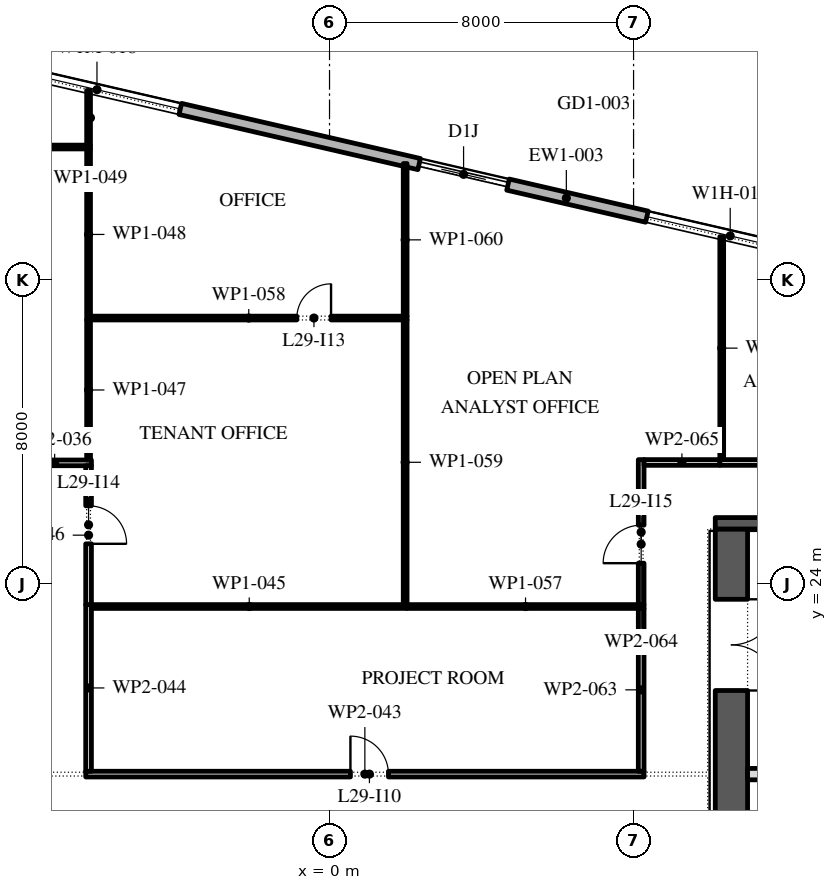
"""IFC4 building model, lengths in metres.
Left out: names, types, materials, properties, quantities, classifications, styles, units other than length and angle.
Written with IfcOpenShell. Run it as: python <this file> out.ifc"""

import sys

from ifc_helpers import new_model, si_unit, direction, frame, frame_2d, origin, place, context, subcontext, project, spatial, rectangle, extrude, element, fill, save


model = new_model("IFC4")
c1 = context("Model", 3, precision=1e-05, world=origin(), true_north=direction((0.0, 1.0)))
c2 = subcontext(c1, "Body", "Model", "MODEL_VIEW")
j1 = project(units=[si_unit("LENGTHUNIT", "METRE"), si_unit("PLANEANGLEUNIT", "RADIAN")], contexts=[c1])
p1 = place(None, origin())
s1 = spatial("IfcSite", under=j1, at=p1, CompositionType="ELEMENT")
p2 = place(p1, origin())
s2 = spatial("IfcBuilding", under=s1, at=p2, CompositionType="ELEMENT")
p3 = place(p2, frame((0.0, 0.0, 135.0)))
s3 = spatial("IfcBuildingStorey", under=s2, at=p3, CompositionType="ELEMENT", Elevation=135.0)
p4 = place(p3, frame((31.078, 28.421, 0.0), z_axis=(0.0, 0.0, 1.0), x_axis=(-0.974370456532, 0.224949357493, 0.0)))
e1 = element("IfcWall", 1, at=p4, inside=s3, PredefinedType="STANDARD", context=c2, shape_type="SweptSolid", body=[
    extrude(rectangle(XDim=51.0, YDim=0.3, at=frame_2d((25.5, 0.0))), origin(), (0.0, 0.0, 1.0), 4.0),
])
p5 = place(p4, frame((1.875, 0.0, 0.45)))
e2 = element("IfcOpeningElement", 2, at=p5, cuts=e1, PredefinedType="OPENING", context=c2, shape_type="SweptSolid", body=[
    extrude(rectangle(XDim=4.5, YDim=2.95, at=frame_2d((2.25, 1.475))), frame((0.0, 0.16, 0.0), z_axis=(0.0, -1.0, 0.0), x_axis=(1.0, 0.0, 0.0)), (0.0, 0.0, 1.0), 0.32),
])
p6 = place(p4, frame((10.275, 0.0, 0.45)))
e3 = element("IfcOpeningElement", 3, at=p6, cuts=e1, PredefinedType="OPENING", context=c2, shape_type="SweptSolid", body=[
    extrude(rectangle(XDim=4.5, YDim=2.825, at=frame_2d((2.25, 1.413))), frame((0.0, 0.16, 0.0), z_axis=(0.0, -1.0, 0.0), x_axis=(1.0, 0.0, 0.0)), (0.0, 0.0, 1.0), 0.32),
])
p7 = place(p4, frame((18.825, 0.0, 0.45)))
e4 = element("IfcOpeningElement", 4, at=p7, cuts=e1, PredefinedType="OPENING", context=c2, shape_type="SweptSolid", body=[
    extrude(rectangle(XDim=4.5, YDim=2.75, at=frame_2d((2.25, 1.375))), frame((0.0, 0.16, 0.0), z_axis=(0.0, -1.0, 0.0), x_axis=(1.0, 0.0, 0.0)), (0.0, 0.0, 1.0), 0.32),
])
p8 = place(p4, frame((27.075, 0.0, 0.0)))
e5 = element("IfcOpeningElement", 5, at=p8, cuts=e1, PredefinedType="OPENING", context=c2, shape_type="SweptSolid", body=[
    extrude(rectangle(XDim=2.4, YDim=3.125, at=frame_2d((1.2, 1.562))), frame((0.0, 0.16, 0.0), z_axis=(0.0, -1.0, 0.0), x_axis=(1.0, 0.0, 0.0)), (0.0, 0.0, 1.0), 0.32),
])
p9 = place(p4, frame((35.925, 0.0, 0.45)))
e6 = element("IfcOpeningElement", 6, at=p9, cuts=e1, PredefinedType="OPENING", context=c2, shape_type="SweptSolid", body=[
    extrude(rectangle(XDim=4.5, YDim=2.575, at=frame_2d((2.25, 1.288))), frame((0.0, 0.16, 0.0), z_axis=(0.0, -1.0, 0.0), x_axis=(1.0, 0.0, 0.0)), (0.0, 0.0, 1.0), 0.32),
])
p10 = place(p4, frame((44.475, 0.0, 0.45)))
e7 = element("IfcOpeningElement", 7, at=p10, cuts=e1, PredefinedType="OPENING", context=c2, shape_type="SweptSolid", body=[
    extrude(rectangle(XDim=4.5, YDim=2.45, at=frame_2d((2.25, 1.225))), frame((0.0, 0.16, 0.0), z_axis=(0.0, -1.0, 0.0), x_axis=(1.0, 0.0, 0.0)), (0.0, 0.0, 1.0), 0.32),
])
p11 = place(p3, frame((10.575, -2.45, 0.0), z_axis=(0.0, 0.0, 1.0), x_axis=(0.0, 1.0, 0.0)))
e8 = element("IfcWall", 8, at=p11, inside=s3, PredefinedType="SHEAR", context=c2, shape_type="SweptSolid", body=[
    extrude(rectangle(XDim=27.9, YDim=0.85, at=frame_2d((13.95, 0.0))), origin(), (0.0, 0.0, 1.0), 4.0),
])
p12 = place(p11, frame((23.65, 0.0, 0.0)))
e9 = element("IfcOpeningElement", 9, at=p12, cuts=e8, PredefinedType="OPENING", context=c2, shape_type="SweptSolid", body=[
    extrude(rectangle(XDim=2.4, YDim=2.1, at=frame_2d((1.2, 1.05))), frame((0.0, 0.435, 0.0), z_axis=(0.0, -1.0, 0.0), x_axis=(1.0, 0.0, 0.0)), (0.0, 0.0, 1.0), 0.87),
])
p13 = place(p11, frame((1.087, 0.0, 0.0)))
e10 = element("IfcOpeningElement", 10, at=p13, cuts=e8, PredefinedType="OPENING", context=c2, shape_type="SweptSolid", body=[
    extrude(rectangle(XDim=0.9, YDim=2.1, at=frame_2d((0.45, 1.05))), frame((0.0, 0.435, 0.0), z_axis=(0.0, -1.0, 0.0), x_axis=(1.0, 0.0, 0.0)), (0.0, 0.0, 1.0), 0.87),
])
p14 = place(p11, frame((4.262, 0.0, 0.0)))
e11 = element("IfcOpeningElement", 11, at=p14, cuts=e8, PredefinedType="OPENING", context=c2, shape_type="SweptSolid", body=[
    extrude(rectangle(XDim=1.0, YDim=2.1, at=frame_2d((0.5, 1.05))), frame((0.0, 0.435, 0.0), z_axis=(0.0, -1.0, 0.0), x_axis=(1.0, 0.0, 0.0)), (0.0, 0.0, 1.0), 0.87),
])
p15 = place(p3, frame((10.15, 25.6, 0.0), z_axis=(0.0, 0.0, 1.0), x_axis=(1.0, 0.0, 0.0)))
e12 = element("IfcWall", 12, at=p15, inside=s3, PredefinedType="SHEAR", context=c2, shape_type="SweptSolid", body=[
    extrude(rectangle(XDim=11.7, YDim=0.3, at=frame_2d((5.85, 0.0))), origin(), (0.0, 0.0, 1.0), 4.0),
])
p16 = place(p3, frame((11.0, 19.0, 0.0), z_axis=(0.0, 0.0, 1.0), x_axis=(1.0, 0.0, 0.0)))
e13 = element("IfcWall", 13, at=p16, inside=s3, PredefinedType="PARTITIONING", context=c2, shape_type="SweptSolid", body=[
    extrude(rectangle(XDim=3.0, YDim=0.3, at=frame_2d((1.5, 0.0))), origin(), (0.0, 0.0, 1.0), 4.0),
])
p17 = place(p3, frame((-14.62, 35.5, 0.0), z_axis=(0.0, 0.0, 1.0), x_axis=(1.0, 0.0, 0.0)))
e14 = element("IfcWall", 14, at=p17, inside=s3, PredefinedType="PARTITIONING", context=c2, shape_type="SweptSolid", body=[
    extrude(rectangle(XDim=8.33, YDim=0.1, at=frame_2d((4.165, 0.0))), origin(), (0.0, 0.0, 1.0), 4.0),
])
p18 = place(p17, frame((5.43, 0.0, 0.0)))
e15 = element("IfcOpeningElement", 15, at=p18, cuts=e14, PredefinedType="OPENING", context=c2, shape_type="SweptSolid", body=[
    extrude(rectangle(XDim=0.9, YDim=2.1, at=frame_2d((0.45, 1.05))), frame((0.0, 0.06, 0.0), z_axis=(0.0, -1.0, 0.0), x_axis=(1.0, 0.0, 0.0)), (0.0, 0.0, 1.0), 0.12),
])
p19 = place(p3, frame((-8.2, 27.19, 0.0), z_axis=(0.0, 0.0, 1.0), x_axis=(1.0, 0.0, 0.0)))
e16 = element("IfcWall", 16, at=p19, inside=s3, PredefinedType="PARTITIONING", context=c2, shape_type="SweptSolid", body=[
    extrude(rectangle(XDim=1.935, YDim=0.15, at=frame_2d((0.968, 0.0))), origin(), (0.0, 0.0, 1.0), 4.0),
])
p20 = place(p3, frame((-6.415, 19.0, 0.0), z_axis=(0.0, 0.0, 1.0), x_axis=(1.0, 0.0, 0.0)))
e17 = element("IfcWall", 17, at=p20, inside=s3, PredefinedType="PARTITIONING", context=c2, shape_type="SweptSolid", body=[
    extrude(rectangle(XDim=14.69, YDim=0.15, at=frame_2d((7.345, 0.0))), origin(), (0.0, 0.0, 1.0), 4.0),
])
p21 = place(p20, frame((6.965, 0.0, 0.0)))
e18 = element("IfcOpeningElement", 18, at=p21, cuts=e17, PredefinedType="OPENING", context=c2, shape_type="SweptSolid", body=[
    extrude(rectangle(XDim=1.0, YDim=2.1, at=frame_2d((0.5, 1.05))), frame((0.0, 0.085, 0.0), z_axis=(0.0, -1.0, 0.0), x_axis=(1.0, 0.0, 0.0)), (0.0, 0.0, 1.0), 0.17),
])
p22 = place(p3, frame((-6.34, 23.46, 0.0), z_axis=(0.0, 0.0, 1.0), x_axis=(0.0, -1.0, 0.0)))
e19 = element("IfcWall", 19, at=p22, inside=s3, PredefinedType="PARTITIONING", context=c2, shape_type="SweptSolid", body=[
    extrude(rectangle(XDim=4.385, YDim=0.15, at=frame_2d((2.192, 0.0))), origin(), (0.0, 0.0, 1.0), 4.0),
])
p23 = place(p3, frame((-6.265, 23.41, 0.0), z_axis=(0.0, 0.0, 1.0), x_axis=(1.0, 0.0, 0.0)))
e20 = element("IfcWall", 20, at=p23, inside=s3, PredefinedType="PARTITIONING", context=c2, shape_type="SweptSolid", body=[
    extrude(rectangle(XDim=8.305, YDim=0.1, at=frame_2d((4.152, 0.0))), origin(), (0.0, 0.0, 1.0), 4.0),
])
p24 = place(p3, frame((-6.34, 27.115, 0.0), z_axis=(0.0, 0.0, 1.0), x_axis=(0.0, -1.0, 0.0)))
e21 = element("IfcWall", 21, at=p24, inside=s3, PredefinedType="PARTITIONING", context=c2, shape_type="SweptSolid", body=[
    extrude(rectangle(XDim=3.655, YDim=0.15, at=frame_2d((1.828, 0.0))), origin(), (0.0, 0.0, 1.0), 4.0),
])
p25 = place(p24, frame((1.055, 0.0, 0.0)))
e22 = element("IfcOpeningElement", 22, at=p25, cuts=e21, PredefinedType="OPENING", context=c2, shape_type="SweptSolid", body=[
    extrude(rectangle(XDim=1.0, YDim=2.1, at=frame_2d((0.5, 1.05))), frame((0.0, 0.085, 0.0), z_axis=(0.0, -1.0, 0.0), x_axis=(1.0, 0.0, 0.0)), (0.0, 0.0, 1.0), 0.17),
])
p26 = place(p3, frame((-6.34, 27.265, 0.0), z_axis=(0.0, 0.0, 1.0), x_axis=(0.0, 1.0, 0.0)))
e23 = element("IfcWall", 23, at=p26, inside=s3, PredefinedType="PARTITIONING", context=c2, shape_type="SweptSolid", body=[
    extrude(rectangle(XDim=3.685, YDim=0.1, at=frame_2d((1.843, 0.0))), origin(), (0.0, 0.0, 1.0), 4.0),
])
p27 = place(p3, frame((-6.34, 30.95, 0.0), z_axis=(0.0, 0.0, 1.0), x_axis=(0.0, 1.0, 0.0)))
e24 = element("IfcWall", 24, at=p27, inside=s3, PredefinedType="PARTITIONING", context=c2, shape_type="SweptSolid", body=[
    extrude(rectangle(XDim=4.5, YDim=0.1, at=frame_2d((2.25, 0.0))), origin(), (0.0, 0.0, 1.0), 4.0),
])
p28 = place(p3, frame((-6.34, 35.55, 0.0), z_axis=(0.0, 0.0, 1.0), x_axis=(0.0, 1.0, 0.0)))
e25 = element("IfcWall", 25, at=p28, inside=s3, PredefinedType="PARTITIONING", context=c2, shape_type="SweptSolid", body=[
    extrude(rectangle(XDim=1.438, YDim=0.1, at=frame_2d((0.719, 0.0))), origin(), (0.0, 0.0, 1.0), 4.0),
])
p29 = place(p3, frame((2.04, 23.41, 0.0), z_axis=(0.0, 0.0, 1.0), x_axis=(1.0, 0.0, 0.0)))
e26 = element("IfcWall", 26, at=p29, inside=s3, PredefinedType="PARTITIONING", context=c2, shape_type="SweptSolid", body=[
    extrude(rectangle(XDim=6.235, YDim=0.1, at=frame_2d((3.117, 0.0))), origin(), (0.0, 0.0, 1.0), 4.0),
])
p30 = place(p3, frame((2.04, 31.0, 0.0), z_axis=(0.0, 0.0, 1.0), x_axis=(-1.0, 0.0, 0.0)))
e27 = element("IfcWall", 27, at=p30, inside=s3, PredefinedType="PARTITIONING", context=c2, shape_type="SweptSolid", body=[
    extrude(rectangle(XDim=8.33, YDim=0.1, at=frame_2d((4.165, 0.0))), origin(), (0.0, 0.0, 1.0), 4.0),
])
p31 = place(p30, frame((2.0, 0.0, 0.0)))
e28 = element("IfcOpeningElement", 28, at=p31, cuts=e27, PredefinedType="OPENING", context=c2, shape_type="SweptSolid", body=[
    extrude(rectangle(XDim=0.9, YDim=2.1, at=frame_2d((0.45, 1.05))), frame((0.0, 0.06, 0.0), z_axis=(0.0, -1.0, 0.0), x_axis=(1.0, 0.0, 0.0)), (0.0, 0.0, 1.0), 0.12),
])
p32 = place(p3, frame((1.99, 30.95, 0.0), z_axis=(0.0, 0.0, 1.0), x_axis=(0.0, -1.0, 0.0)))
e29 = element("IfcWall", 29, at=p32, inside=s3, PredefinedType="PARTITIONING", context=c2, shape_type="SweptSolid", body=[
    extrude(rectangle(XDim=7.49, YDim=0.1, at=frame_2d((3.745, 0.0))), origin(), (0.0, 0.0, 1.0), 4.0),
])
p33 = place(p3, frame((1.99, 35.065, 0.0), z_axis=(0.0, 0.0, 1.0), x_axis=(0.0, -1.0, 0.0)))
e30 = element("IfcWall", 30, at=p33, inside=s3, PredefinedType="PARTITIONING", context=c2, shape_type="SweptSolid", body=[
    extrude(rectangle(XDim=4.015, YDim=0.1, at=frame_2d((2.007, 0.0))), origin(), (0.0, 0.0, 1.0), 4.0),
])
p34 = place(p3, frame((8.2, 19.075, 0.0), z_axis=(0.0, 0.0, 1.0), x_axis=(0.0, 1.0, 0.0)))
e31 = element("IfcWall", 31, at=p34, inside=s3, PredefinedType="PARTITIONING", context=c2, shape_type="SweptSolid", body=[
    extrude(rectangle(XDim=4.285, YDim=0.15, at=frame_2d((2.143, 0.0))), origin(), (0.0, 0.0, 1.0), 4.0),
])
p35 = place(p3, frame((8.2, 23.46, 0.0), z_axis=(0.0, 0.0, 1.0), x_axis=(0.0, 1.0, 0.0)))
e32 = element("IfcWall", 32, at=p35, inside=s3, PredefinedType="PARTITIONING", context=c2, shape_type="SweptSolid", body=[
    extrude(rectangle(XDim=3.815, YDim=0.15, at=frame_2d((1.907, 0.0))), origin(), (0.0, 0.0, 1.0), 4.0),
])
p36 = place(p35, frame((1.09, 0.0, 0.0)))
e33 = element("IfcOpeningElement", 33, at=p36, cuts=e32, PredefinedType="OPENING", context=c2, shape_type="SweptSolid", body=[
    extrude(rectangle(XDim=1.0, YDim=2.1, at=frame_2d((0.5, 1.05))), frame((0.0, 0.085, 0.0), z_axis=(0.0, -1.0, 0.0), x_axis=(1.0, 0.0, 0.0)), (0.0, 0.0, 1.0), 0.17),
])
p37 = place(p3, frame((8.275, 27.2, 0.0), z_axis=(0.0, 0.0, 1.0), x_axis=(1.0, 0.0, 0.0)))
e34 = element("IfcWall", 34, at=p37, inside=s3, PredefinedType="PARTITIONING", context=c2, shape_type="SweptSolid", body=[
    extrude(rectangle(XDim=1.995, YDim=0.15, at=frame_2d((0.998, 0.0))), origin(), (0.0, 0.0, 1.0), 4.0),
])
p38 = place(p3, frame((10.27, 27.2, 0.0), z_axis=(0.0, 0.0, 1.0), x_axis=(1.0, 0.0, 0.0)))
e35 = element("IfcWall", 35, at=p38, inside=s3, PredefinedType="PARTITIONING", context=c2, shape_type="SweptSolid", body=[
    extrude(rectangle(XDim=12.79, YDim=0.15, at=frame_2d((6.395, 0.0))), origin(), (0.0, 0.0, 1.0), 4.0),
])
p39 = place(p38, frame((7.09, 0.0, 0.0)))
e36 = element("IfcOpeningElement", 36, at=p39, cuts=e35, PredefinedType="OPENING", context=c2, shape_type="SweptSolid", body=[
    extrude(rectangle(XDim=1.0, YDim=2.1, at=frame_2d((0.5, 1.05))), frame((0.0, 0.085, 0.0), z_axis=(0.0, -1.0, 0.0), x_axis=(1.0, 0.0, 0.0)), (0.0, 0.0, 1.0), 0.17),
])
p40 = place(p3, frame((10.32, 33.142, 0.0), z_axis=(0.0, 0.0, 1.0), x_axis=(0.0, -1.0, 0.0)))
e37 = element("IfcWall", 37, at=p40, inside=s3, PredefinedType="PARTITIONING", context=c2, shape_type="SweptSolid", body=[
    extrude(rectangle(XDim=5.867, YDim=0.1, at=frame_2d((2.934, 0.0))), origin(), (0.0, 0.0, 1.0), 4.0),
])
p41 = place(p7, origin())
e38 = element("IfcWindow", 38, at=p41, inside=s3, PartitioningType="DOUBLE_PANEL_VERTICAL", PredefinedType="WINDOW", context=c2, shape_type="SweptSolid", body=[
    extrude(rectangle(XDim=4.5, YDim=2.75, at=frame_2d((2.25, 1.375))), frame((0.0, 0.03, 0.0), z_axis=(0.0, -1.0, 0.0), x_axis=(1.0, 0.0, 0.0)), (0.0, 0.0, 1.0), 0.06),
])
fill(e4, e38)
p42 = place(p8, origin())
e39 = element("IfcDoor", 39, at=p42, inside=s3, OperationType="DOUBLE_DOOR_SLIDING", PredefinedType="DOOR", context=c2, shape_type="SweptSolid", body=[
    extrude(rectangle(XDim=2.4, YDim=3.125, at=frame_2d((1.2, 1.562))), frame((0.0, 0.025, 0.0), z_axis=(0.0, -1.0, 0.0), x_axis=(1.0, 0.0, 0.0)), (0.0, 0.0, 1.0), 0.05),
])
fill(e5, e39)
p43 = place(p9, origin())
e40 = element("IfcWindow", 40, at=p43, inside=s3, PartitioningType="DOUBLE_PANEL_VERTICAL", PredefinedType="WINDOW", context=c2, shape_type="SweptSolid", body=[
    extrude(rectangle(XDim=4.5, YDim=2.575, at=frame_2d((2.25, 1.288))), frame((0.0, 0.03, 0.0), z_axis=(0.0, -1.0, 0.0), x_axis=(1.0, 0.0, 0.0)), (0.0, 0.0, 1.0), 0.06),
])
fill(e6, e40)
p44 = place(p12, frame((2.4, 0.0, 0.0), z_axis=(0.0, 0.0, 1.0), x_axis=(-1.0, 0.0, 0.0)))
e41 = element("IfcDoor", 41, at=p44, inside=s3, OperationType="DOUBLE_DOOR_SINGLE_SWING", PredefinedType="DOOR", context=c2, shape_type="SweptSolid", body=[
    extrude(rectangle(XDim=2.4, YDim=2.1, at=frame_2d((1.2, 1.05))), frame((0.0, 0.025, 0.0), z_axis=(0.0, -1.0, 0.0), x_axis=(1.0, 0.0, 0.0)), (0.0, 0.0, 1.0), 0.05),
])
fill(e9, e41)
p45 = place(p21, origin())
e42 = element("IfcDoor", 42, at=p45, inside=s3, OperationType="SINGLE_SWING_RIGHT", PredefinedType="DOOR", context=c2, shape_type="SweptSolid", body=[
    extrude(rectangle(XDim=1.0, YDim=2.1, at=frame_2d((0.5, 1.05))), frame((0.0, 0.025, 0.0), z_axis=(0.0, -1.0, 0.0), x_axis=(1.0, 0.0, 0.0)), (0.0, 0.0, 1.0), 0.05),
])
fill(e18, e42)
p46 = place(p31, frame((0.9, 0.0, 0.0), z_axis=(0.0, 0.0, 1.0), x_axis=(-1.0, 0.0, 0.0)))
e43 = element("IfcDoor", 43, at=p46, inside=s3, OperationType="SINGLE_SWING_LEFT", PredefinedType="DOOR", context=c2, shape_type="SweptSolid", body=[
    extrude(rectangle(XDim=0.9, YDim=2.1, at=frame_2d((0.45, 1.05))), frame((0.0, 0.025, 0.0), z_axis=(0.0, -1.0, 0.0), x_axis=(1.0, 0.0, 0.0)), (0.0, 0.0, 1.0), 0.05),
])
fill(e28, e43)
p47 = place(p25, origin())
e44 = element("IfcDoor", 44, at=p47, inside=s3, OperationType="SINGLE_SWING_LEFT", PredefinedType="DOOR", context=c2, shape_type="SweptSolid", body=[
    extrude(rectangle(XDim=1.0, YDim=2.1, at=frame_2d((0.5, 1.05))), frame((0.0, 0.025, 0.0), z_axis=(0.0, -1.0, 0.0), x_axis=(1.0, 0.0, 0.0)), (0.0, 0.0, 1.0), 0.05),
])
fill(e22, e44)
p48 = place(p36, origin())
e45 = element("IfcDoor", 45, at=p48, inside=s3, OperationType="SINGLE_SWING_RIGHT", PredefinedType="DOOR", context=c2, shape_type="SweptSolid", body=[
    extrude(rectangle(XDim=1.0, YDim=2.1, at=frame_2d((0.5, 1.05))), frame((0.0, 0.025, 0.0), z_axis=(0.0, -1.0, 0.0), x_axis=(1.0, 0.0, 0.0)), (0.0, 0.0, 1.0), 0.05),
])
fill(e33, e45)
save(model, sys.argv[1])
